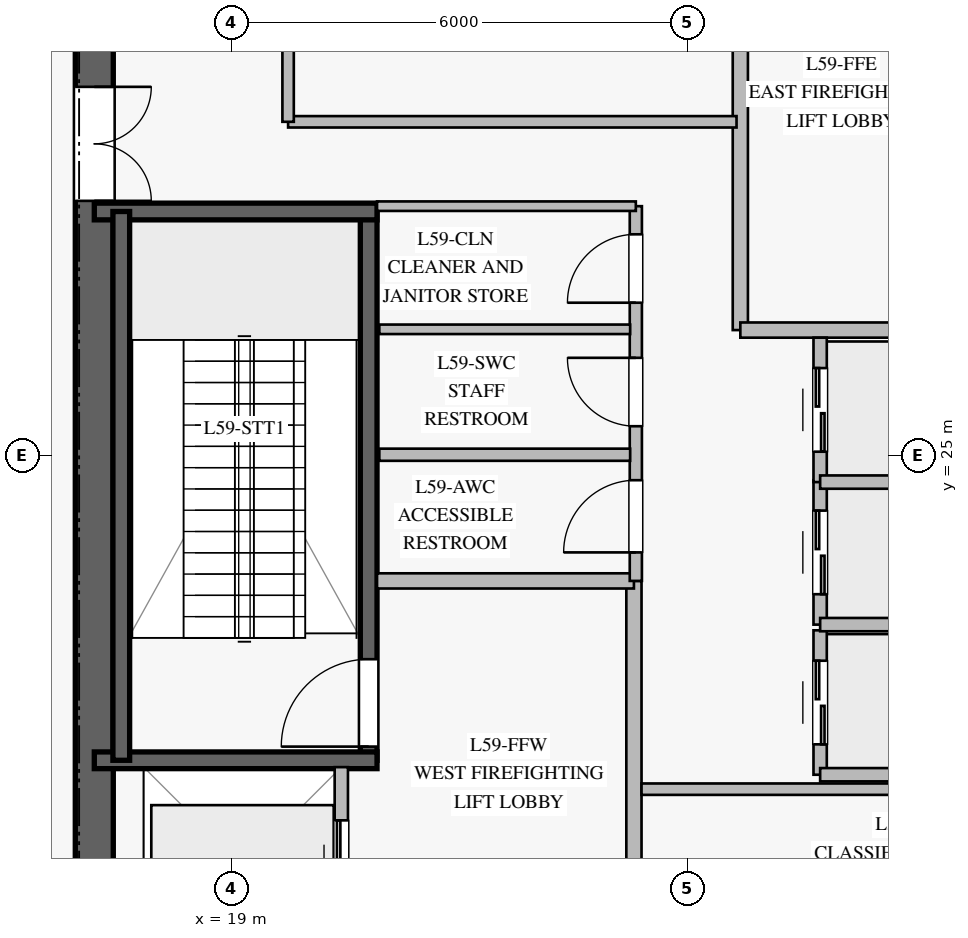
"""IFC4 building model, lengths in metres.
Left out: names, types, materials, properties, quantities, classifications, styles, units other than length and angle.
Written with IfcOpenShell. Run it as: python <this file> out.ifc"""

import sys

from ifc_helpers import new_model, si_unit, direction, frame, frame_2d, origin, place, context, subcontext, project, spatial, rectangle, extrude, element, fill, save


model = new_model("IFC4")
c1 = context("Model", 3, precision=1e-05, world=origin(), true_north=direction((0.0, 1.0)))
c2 = subcontext(c1, "Body", "Model", "MODEL_VIEW")
j1 = project(units=[si_unit("LENGTHUNIT", "METRE"), si_unit("PLANEANGLEUNIT", "RADIAN")], contexts=[c1])
p1 = place(None, origin())
s1 = spatial("IfcSite", under=j1, at=p1, CompositionType="ELEMENT")
p2 = place(p1, origin())
s2 = spatial("IfcBuilding", under=s1, at=p2, CompositionType="ELEMENT")
p3 = place(p2, frame((0.0, 0.0, 244.8)))
s3 = spatial("IfcBuildingStorey", under=s2, at=p3, CompositionType="ELEMENT", Elevation=244.8)
p4 = place(p3, frame((17.2, 31.95, 0.0), z_axis=(0.0, 0.0, 1.0), x_axis=(0.0, -1.0, 0.0)))
e1 = element("IfcWall", 1, at=p4, inside=s3, PredefinedType="SHEAR", context=c2, shape_type="SweptSolid", body=[
    extrude(rectangle(XDim=13.9, YDim=0.5, at=frame_2d((6.95, 0.0))), origin(), (0.0, 0.0, 1.0), 5.18),
])
p5 = place(p4, frame((2.1, 0.0, 0.0)))
e2 = element("IfcOpeningElement", 2, at=p5, cuts=e1, PredefinedType="OPENING", context=c2, shape_type="SweptSolid", body=[
    extrude(rectangle(XDim=1.5, YDim=2.2, at=frame_2d((0.75, 1.1))), frame((0.0, 0.26, 0.0), z_axis=(0.0, -1.0, 0.0), x_axis=(1.0, 0.0, 0.0)), (0.0, 0.0, 1.0), 0.52),
])
p6 = place(p3, frame((20.81, 20.99, 0.0), z_axis=(0.0, 0.0, 1.0), x_axis=(0.0, 1.0, 0.0)))
e3 = element("IfcWall", 3, at=p6, inside=s3, PredefinedType="SOLIDWALL", context=c2, shape_type="SweptSolid", body=[
    extrude(rectangle(XDim=7.22, YDim=0.22, at=frame_2d((3.61, 0.0))), origin(), (0.0, 0.0, 1.0), 5.18),
])
p7 = place(p6, frame((0.18, 0.0, 0.0)))
e4 = element("IfcOpeningElement", 4, at=p7, cuts=e3, PredefinedType="OPENING", context=c2, shape_type="SweptSolid", body=[
    extrude(rectangle(XDim=1.15, YDim=2.2, at=frame_2d((0.575, 1.1))), frame((0.0, 0.12, 0.0), z_axis=(0.0, -1.0, 0.0), x_axis=(1.0, 0.0, 0.0)), (0.0, 0.0, 1.0), 0.24),
])
for number, where, z_axis, x_axis in (
    (5, (17.2, 20.99, 0.0), (0.0, 0.0, 1.0), (1.0, 0.0, 0.0)),
    (6, (17.2, 28.21, 0.0), (0.0, 0.0, 1.0), (1.0, 0.0, 0.0)),
):
    element("IfcWall", number, at=place(p3, frame(where, z_axis=z_axis, x_axis=x_axis)), inside=s3, PredefinedType="SOLIDWALL", context=c2, shape_type="SweptSolid", body=[
        extrude(rectangle(XDim=3.72, YDim=0.22, at=frame_2d((1.86, 0.0))), origin(), (0.0, 0.0, 1.0), 5.18),
    ])
p8 = place(p3, frame((17.555, 28.21, 0.0), z_axis=(0.0, 0.0, 1.0), x_axis=(0.0, -1.0, 0.0)))
e7 = element("IfcWall", 7, at=p8, inside=s3, PredefinedType="SOLIDWALL", context=c2, shape_type="SweptSolid", body=[
    extrude(rectangle(XDim=7.22, YDim=0.22, at=frame_2d((3.61, 0.0))), origin(), (0.0, 0.0, 1.0), 5.18),
])
p9 = place(p3, frame((24.3, 18.2, 0.0), z_axis=(0.0, 0.0, 1.0), x_axis=(0.0, 1.0, 0.0)))
e8 = element("IfcWall", 8, at=p9, inside=s3, PredefinedType="PARTITIONING", context=c2, shape_type="SweptSolid", body=[
    extrude(rectangle(XDim=5.15, YDim=0.2, at=frame_2d((2.575, 0.0))), origin(), (0.0, 0.0, 1.0), 5.18),
])
p10 = place(p3, frame((20.92, 23.35, 0.0), z_axis=(0.0, 0.0, 1.0), x_axis=(1.0, 0.0, 0.0)))
e9 = element("IfcWall", 9, at=p10, inside=s3, PredefinedType="PARTITIONING", context=c2, shape_type="SweptSolid", body=[
    extrude(rectangle(XDim=3.38, YDim=0.2, at=frame_2d((1.69, 0.0))), origin(), (0.0, 0.0, 1.0), 5.18),
])
p11 = place(p3, frame((25.7, 26.65, 0.0), z_axis=(0.0, 0.0, 1.0), x_axis=(0.0, 1.0, 0.0)))
e10 = element("IfcWall", 10, at=p11, inside=s3, PredefinedType="PARTITIONING", context=c2, shape_type="SweptSolid", body=[
    extrude(rectangle(XDim=5.15, YDim=0.2, at=frame_2d((2.575, 0.0))), origin(), (0.0, 0.0, 1.0), 5.18),
])
p12 = place(p3, frame((25.7, 26.65, 0.0), z_axis=(0.0, 0.0, 1.0), x_axis=(1.0, 0.0, 0.0)))
e11 = element("IfcWall", 11, at=p12, inside=s3, PredefinedType="PARTITIONING", context=c2, shape_type="SweptSolid", body=[
    extrude(rectangle(XDim=3.38, YDim=0.2, at=frame_2d((1.69, 0.0))), origin(), (0.0, 0.0, 1.0), 5.18),
])
p13 = place(p3, frame((24.325, 23.35, 0.0), z_axis=(0.0, 0.0, 1.0), x_axis=(0.0, 1.0, 0.0)))
e12 = element("IfcWall", 12, at=p13, inside=s3, PredefinedType="PLUMBINGWALL", context=c2, shape_type="SweptSolid", body=[
    extrude(rectangle(XDim=4.93, YDim=0.16, at=frame_2d((2.465, 0.0))), origin(), (0.0, 0.0, 1.0), 5.18),
])
p14 = place(p13, frame((0.375, 0.0, 0.0)))
e13 = element("IfcOpeningElement", 13, at=p14, cuts=e12, PredefinedType="OPENING", context=c2, shape_type="SweptSolid", body=[
    extrude(rectangle(XDim=0.95, YDim=2.1, at=frame_2d((0.475, 1.05))), frame((0.0, 0.09, 0.0), z_axis=(0.0, -1.0, 0.0), x_axis=(1.0, 0.0, 0.0)), (0.0, 0.0, 1.0), 0.18),
])
p15 = place(p13, frame((2.035, 0.0, 0.0)))
e14 = element("IfcOpeningElement", 14, at=p15, cuts=e12, PredefinedType="OPENING", context=c2, shape_type="SweptSolid", body=[
    extrude(rectangle(XDim=0.9, YDim=2.1, at=frame_2d((0.45, 1.05))), frame((0.0, 0.09, 0.0), z_axis=(0.0, -1.0, 0.0), x_axis=(1.0, 0.0, 0.0)), (0.0, 0.0, 1.0), 0.18),
])
p16 = place(p13, frame((3.66, 0.0, 0.0)))
e15 = element("IfcOpeningElement", 15, at=p16, cuts=e12, PredefinedType="OPENING", context=c2, shape_type="SweptSolid", body=[
    extrude(rectangle(XDim=0.9, YDim=2.1, at=frame_2d((0.45, 1.05))), frame((0.0, 0.09, 0.0), z_axis=(0.0, -1.0, 0.0), x_axis=(1.0, 0.0, 0.0)), (0.0, 0.0, 1.0), 0.18),
])
p17 = place(p3, frame((20.92, 28.28, 0.0), z_axis=(0.0, 0.0, 1.0), x_axis=(1.0, 0.0, 0.0)))
e16 = element("IfcWall", 16, at=p17, inside=s3, PredefinedType="PARTITIONING", context=c2, shape_type="SweptSolid", body=[
    extrude(rectangle(XDim=3.405, YDim=0.125, at=frame_2d((1.703, 0.0))), origin(), (0.0, 0.0, 1.0), 5.18),
])
p18 = place(p3, frame((20.95, 25.01, 0.0), z_axis=(0.0, 0.0, 1.0), x_axis=(1.0, 0.0, 0.0)))
e17 = element("IfcWall", 17, at=p18, inside=s3, PredefinedType="PLUMBINGWALL", context=c2, shape_type="SweptSolid", body=[
    extrude(rectangle(XDim=3.3, YDim=0.16, at=frame_2d((1.65, 0.0))), origin(), (0.0, 0.0, 1.0), 5.18),
])
p19 = place(p3, frame((20.95, 26.66, 0.0), z_axis=(0.0, 0.0, 1.0), x_axis=(1.0, 0.0, 0.0)))
e18 = element("IfcWall", 18, at=p19, inside=s3, PredefinedType="PARTITIONING", context=c2, shape_type="SweptSolid", body=[
    extrude(rectangle(XDim=3.3, YDim=0.125, at=frame_2d((1.65, 0.0))), origin(), (0.0, 0.0, 1.0), 5.18),
])
p20 = place(p3, frame((24.4, 20.61, 0.0), z_axis=(0.0, 0.0, 1.0), x_axis=(1.0, 0.0, 0.0)))
e19 = element("IfcWall", 19, at=p20, inside=s3, PredefinedType="PARTITIONING", context=c2, shape_type="SweptSolid", body=[
    extrude(rectangle(XDim=5.9, YDim=0.15, at=frame_2d((2.95, 0.0))), origin(), (0.0, 0.0, 1.0), 5.18),
])
p21 = place(p3, frame((19.75, 29.39, 0.0), z_axis=(0.0, 0.0, 1.0), x_axis=(1.0, 0.0, 0.0)))
e20 = element("IfcWall", 20, at=p21, inside=s3, PredefinedType="PARTITIONING", context=c2, shape_type="SweptSolid", body=[
    extrude(rectangle(XDim=5.9, YDim=0.15, at=frame_2d((2.95, 0.0))), origin(), (0.0, 0.0, 1.0), 5.18),
])
p22 = place(p3, frame((19.75, 29.39, 0.0), z_axis=(0.0, 0.0, 1.0), x_axis=(0.0, 1.0, 0.0)))
e21 = element("IfcWall", 21, at=p22, inside=s3, PredefinedType="PARTITIONING", context=c2, shape_type="SweptSolid", body=[
    extrude(rectangle(XDim=2.41, YDim=0.15, at=frame_2d((1.205, 0.0))), origin(), (0.0, 0.0, 1.0), 5.18),
])
p23 = place(p3, frame((26.75, 20.8, 0.0), z_axis=(0.0, 0.0, 1.0), x_axis=(0.0, 1.0, 0.0)))
e22 = element("IfcWall", 22, at=p23, inside=s3, PredefinedType="PARTITIONING", context=c2, shape_type="SweptSolid", body=[
    extrude(rectangle(XDim=1.9, YDim=0.175, at=frame_2d((0.95, 0.0))), origin(), (0.0, 0.0, 1.0), 5.18),
])
p24 = place(p23, frame((0.4, 0.0, 0.0)))
e23 = element("IfcOpeningElement", 23, at=p24, cuts=e22, PredefinedType="OPENING", context=c2, shape_type="SweptSolid", body=[
    extrude(rectangle(XDim=1.1, YDim=2.2, at=frame_2d((0.55, 1.1))), frame((0.0, 0.098, 0.0), z_axis=(0.0, -1.0, 0.0), x_axis=(1.0, 0.0, 0.0)), (0.0, 0.0, 1.0), 0.195),
])
p25 = place(p3, frame((26.75, 20.8, 0.0), z_axis=(0.0, 0.0, 1.0), x_axis=(1.0, 0.0, 0.0)))
e24 = element("IfcWall", 24, at=p25, inside=s3, PredefinedType="PARTITIONING", context=c2, shape_type="SweptSolid", body=[
    extrude(rectangle(XDim=2.35, YDim=0.175, at=frame_2d((1.175, 0.0))), origin(), (0.0, 0.0, 1.0), 5.18),
])
p26 = place(p3, frame((26.75, 22.775, 0.0), z_axis=(0.0, 0.0, 1.0), x_axis=(0.0, 1.0, 0.0)))
e25 = element("IfcWall", 25, at=p26, inside=s3, PredefinedType="PARTITIONING", context=c2, shape_type="SweptSolid", body=[
    extrude(rectangle(XDim=1.9, YDim=0.175, at=frame_2d((0.95, 0.0))), origin(), (0.0, 0.0, 1.0), 5.18),
])
p27 = place(p26, frame((0.4, 0.0, 0.0)))
e26 = element("IfcOpeningElement", 26, at=p27, cuts=e25, PredefinedType="OPENING", context=c2, shape_type="SweptSolid", body=[
    extrude(rectangle(XDim=1.1, YDim=2.2, at=frame_2d((0.55, 1.1))), frame((0.0, 0.098, 0.0), z_axis=(0.0, -1.0, 0.0), x_axis=(1.0, 0.0, 0.0)), (0.0, 0.0, 1.0), 0.195),
])
p28 = place(p3, frame((26.75, 22.775, 0.0), z_axis=(0.0, 0.0, 1.0), x_axis=(1.0, 0.0, 0.0)))
e27 = element("IfcWall", 27, at=p28, inside=s3, PredefinedType="PARTITIONING", context=c2, shape_type="SweptSolid", body=[
    extrude(rectangle(XDim=2.35, YDim=0.175, at=frame_2d((1.175, 0.0))), origin(), (0.0, 0.0, 1.0), 5.18),
])
p29 = place(p3, frame((26.75, 24.65, 0.0), z_axis=(0.0, 0.0, 1.0), x_axis=(0.0, 1.0, 0.0)))
e28 = element("IfcWall", 28, at=p29, inside=s3, PredefinedType="PARTITIONING", context=c2, shape_type="SweptSolid", body=[
    extrude(rectangle(XDim=1.9, YDim=0.175, at=frame_2d((0.95, 0.0))), origin(), (0.0, 0.0, 1.0), 5.18),
])
p30 = place(p29, frame((0.4, 0.0, 0.0)))
e29 = element("IfcOpeningElement", 29, at=p30, cuts=e28, PredefinedType="OPENING", context=c2, shape_type="SweptSolid", body=[
    extrude(rectangle(XDim=1.1, YDim=2.2, at=frame_2d((0.55, 1.1))), frame((0.0, 0.098, 0.0), z_axis=(0.0, -1.0, 0.0), x_axis=(1.0, 0.0, 0.0)), (0.0, 0.0, 1.0), 0.195),
])
p31 = place(p3, frame((26.75, 24.65, 0.0), z_axis=(0.0, 0.0, 1.0), x_axis=(1.0, 0.0, 0.0)))
e30 = element("IfcWall", 30, at=p31, inside=s3, PredefinedType="PARTITIONING", context=c2, shape_type="SweptSolid", body=[
    extrude(rectangle(XDim=2.35, YDim=0.175, at=frame_2d((1.175, 0.0))), origin(), (0.0, 0.0, 1.0), 5.18),
])
p32 = place(p3, frame((20.45, 18.3, 0.0), z_axis=(0.0, 0.0, 1.0), x_axis=(0.0, 1.0, 0.0)))
e31 = element("IfcWall", 31, at=p32, inside=s3, PredefinedType="PARTITIONING", context=c2, shape_type="SweptSolid", body=[
    extrude(rectangle(XDim=2.6, YDim=0.175, at=frame_2d((1.3, 0.0))), origin(), (0.0, 0.0, 1.0), 5.18),
])
p33 = place(p32, frame((0.7, 0.0, 0.0)))
e32 = element("IfcOpeningElement", 32, at=p33, cuts=e31, PredefinedType="OPENING", context=c2, shape_type="SweptSolid", body=[
    extrude(rectangle(XDim=1.2, YDim=2.2, at=frame_2d((0.6, 1.1))), frame((0.0, 0.098, 0.0), z_axis=(0.0, -1.0, 0.0), x_axis=(1.0, 0.0, 0.0)), (0.0, 0.0, 1.0), 0.195),
])
p34 = place(p7, origin())
e33 = element("IfcDoor", 33, at=p34, inside=s3, OperationType="SINGLE_SWING_LEFT", PredefinedType="DOOR", context=c2, shape_type="SweptSolid", body=[
    extrude(rectangle(XDim=1.15, YDim=2.2, at=frame_2d((0.575, 1.1))), frame((0.0, 0.025, 0.0), z_axis=(0.0, -1.0, 0.0), x_axis=(1.0, 0.0, 0.0)), (0.0, 0.0, 1.0), 0.05),
])
fill(e4, e33)
p35 = place(p5, origin())
e34 = element("IfcDoor", 34, at=p35, inside=s3, OperationType="DOUBLE_DOOR_SINGLE_SWING", PredefinedType="DOOR", context=c2, shape_type="SweptSolid", body=[
    extrude(rectangle(XDim=1.5, YDim=2.2, at=frame_2d((0.75, 1.1))), frame((0.0, 0.025, 0.0), z_axis=(0.0, -1.0, 0.0), x_axis=(1.0, 0.0, 0.0)), (0.0, 0.0, 1.0), 0.05),
])
fill(e2, e34)
p36 = place(p14, origin())
e35 = element("IfcDoor", 35, at=p36, inside=s3, OperationType="SINGLE_SWING_LEFT", PredefinedType="DOOR", context=c2, shape_type="SweptSolid", body=[
    extrude(rectangle(XDim=0.95, YDim=2.1, at=frame_2d((0.475, 1.05))), frame((0.0, 0.025, 0.0), z_axis=(0.0, -1.0, 0.0), x_axis=(1.0, 0.0, 0.0)), (0.0, 0.0, 1.0), 0.05),
])
fill(e13, e35)
p37 = place(p15, origin())
e36 = element("IfcDoor", 36, at=p37, inside=s3, OperationType="SINGLE_SWING_RIGHT", PredefinedType="DOOR", context=c2, shape_type="SweptSolid", body=[
    extrude(rectangle(XDim=0.9, YDim=2.1, at=frame_2d((0.45, 1.05))), frame((0.0, 0.025, 0.0), z_axis=(0.0, -1.0, 0.0), x_axis=(1.0, 0.0, 0.0)), (0.0, 0.0, 1.0), 0.05),
])
fill(e14, e36)
p38 = place(p16, origin())
e37 = element("IfcDoor", 37, at=p38, inside=s3, OperationType="SINGLE_SWING_LEFT", PredefinedType="DOOR", context=c2, shape_type="SweptSolid", body=[
    extrude(rectangle(XDim=0.9, YDim=2.1, at=frame_2d((0.45, 1.05))), frame((0.0, 0.025, 0.0), z_axis=(0.0, -1.0, 0.0), x_axis=(1.0, 0.0, 0.0)), (0.0, 0.0, 1.0), 0.05),
])
fill(e15, e37)
p39 = place(p24, origin())
e38 = element("IfcDoor", 38, at=p39, inside=s3, OperationType="DOUBLE_DOOR_SLIDING", PredefinedType="DOOR", context=c2, shape_type="SweptSolid", body=[
    extrude(rectangle(XDim=1.1, YDim=2.2, at=frame_2d((0.55, 1.1))), frame((0.0, 0.025, 0.0), z_axis=(0.0, -1.0, 0.0), x_axis=(1.0, 0.0, 0.0)), (0.0, 0.0, 1.0), 0.05),
])
fill(e23, e38)
p40 = place(p27, origin())
e39 = element("IfcDoor", 39, at=p40, inside=s3, OperationType="DOUBLE_DOOR_SLIDING", PredefinedType="DOOR", context=c2, shape_type="SweptSolid", body=[
    extrude(rectangle(XDim=1.1, YDim=2.2, at=frame_2d((0.55, 1.1))), frame((0.0, 0.025, 0.0), z_axis=(0.0, -1.0, 0.0), x_axis=(1.0, 0.0, 0.0)), (0.0, 0.0, 1.0), 0.05),
])
fill(e26, e39)
p41 = place(p30, origin())
e40 = element("IfcDoor", 40, at=p41, inside=s3, OperationType="DOUBLE_DOOR_SLIDING", PredefinedType="DOOR", context=c2, shape_type="SweptSolid", body=[
    extrude(rectangle(XDim=1.1, YDim=2.2, at=frame_2d((0.55, 1.1))), frame((0.0, 0.025, 0.0), z_axis=(0.0, -1.0, 0.0), x_axis=(1.0, 0.0, 0.0)), (0.0, 0.0, 1.0), 0.05),
])
fill(e29, e40)
p42 = place(p33, origin())
e41 = element("IfcDoor", 41, at=p42, inside=s3, OperationType="DOUBLE_DOOR_SLIDING", PredefinedType="DOOR", context=c2, shape_type="SweptSolid", body=[
    extrude(rectangle(XDim=1.2, YDim=2.2, at=frame_2d((0.6, 1.1))), frame((0.0, 0.025, 0.0), z_axis=(0.0, -1.0, 0.0), x_axis=(1.0, 0.0, 0.0)), (0.0, 0.0, 1.0), 0.05),
])
fill(e32, e41)
save(model, sys.argv[1])
